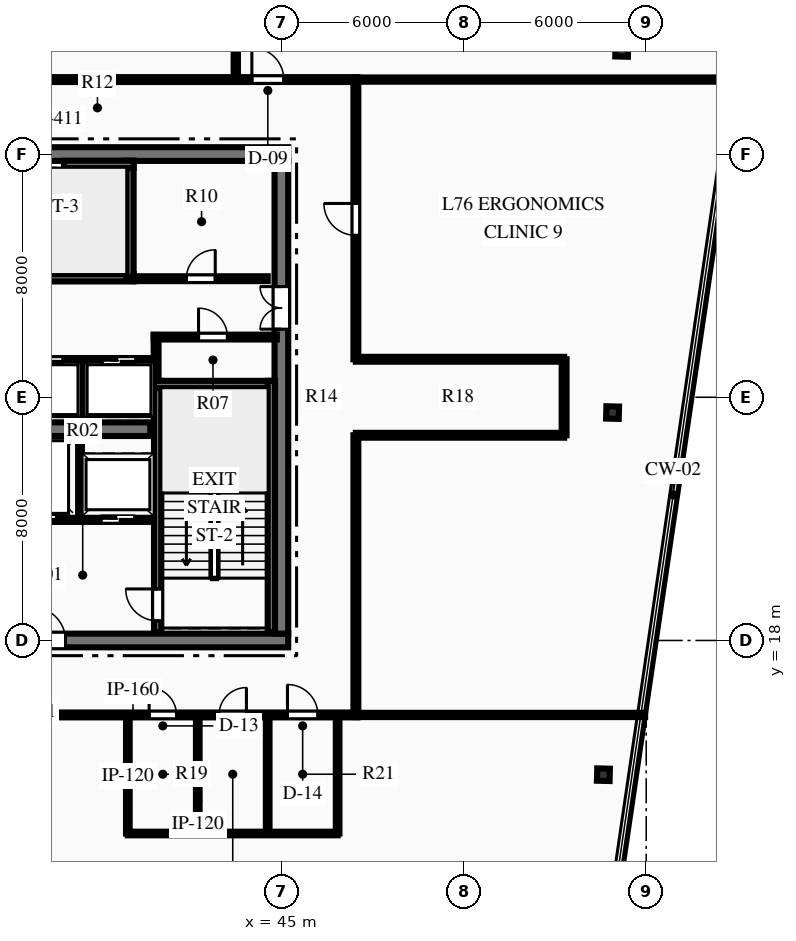
"""IFC4 building model, lengths in metres.
Left out: names, types, materials, properties, quantities, classifications, styles, units other than length and angle.
Written with IfcOpenShell. Run it as: python <this file> out.ifc"""

import sys

from ifc_helpers import new_model, si_unit, direction, frame, frame_2d, origin, origin_2d, place, context, subcontext, project, spatial, rectangle, i_section, extrude, element, fill, save


model = new_model("IFC4")
c1 = context("Model", 3, precision=1e-05, world=origin(), true_north=direction((0.0, 1.0)))
c2 = subcontext(c1, "Body", "Model", "MODEL_VIEW")
j1 = project(units=[si_unit("LENGTHUNIT", "METRE"), si_unit("PLANEANGLEUNIT", "RADIAN")], contexts=[c1])
p1 = place(None, origin())
s1 = spatial("IfcSite", under=j1, at=p1, CompositionType="ELEMENT")
p2 = place(p1, origin())
s2 = spatial("IfcBuilding", under=s1, at=p2, CompositionType="ELEMENT")
p3 = place(p2, frame((0.0, 0.0, 302.7)))
s3 = spatial("IfcBuildingStorey", under=s2, at=p3, CompositionType="ELEMENT", Elevation=302.7)
p4 = place(p3, frame((26.775, 18.0, 0.0), z_axis=(0.0, 0.0, 1.0), x_axis=(1.0, 0.0, 0.0)))
e1 = element("IfcWall", 1, at=p4, inside=s3, PredefinedType="SHEAR", context=c2, shape_type="SweptSolid", body=[
    extrude(rectangle(XDim=18.45, YDim=0.45, at=frame_2d((9.225, 0.0))), origin(), (0.0, 0.0, 1.0), 3.75),
])
p5 = place(p4, frame((7.325, 0.0, 0.0)))
e2 = element("IfcOpeningElement", 2, at=p5, cuts=e1, PredefinedType="OPENING", context=c2, shape_type="SweptSolid", body=[
    extrude(rectangle(XDim=1.1, YDim=2.15, at=frame_2d((0.55, 1.075))), frame((0.0, 0.235, 0.0), z_axis=(0.0, -1.0, 0.0), x_axis=(1.0, 0.0, 0.0)), (0.0, 0.0, 1.0), 0.47),
])
p6 = place(p4, frame((10.025, 0.0, 0.0)))
e3 = element("IfcOpeningElement", 3, at=p6, cuts=e1, PredefinedType="OPENING", context=c2, shape_type="SweptSolid", body=[
    extrude(rectangle(XDim=1.1, YDim=2.15, at=frame_2d((0.55, 1.075))), frame((0.0, 0.235, 0.0), z_axis=(0.0, -1.0, 0.0), x_axis=(1.0, 0.0, 0.0)), (0.0, 0.0, 1.0), 0.47),
])
p7 = place(p3, frame((26.775, 34.0, 0.0), z_axis=(0.0, 0.0, 1.0), x_axis=(1.0, 0.0, 0.0)))
e4 = element("IfcWall", 4, at=p7, inside=s3, PredefinedType="SHEAR", context=c2, shape_type="SweptSolid", body=[
    extrude(rectangle(XDim=18.45, YDim=0.45, at=frame_2d((9.225, 0.0))), origin(), (0.0, 0.0, 1.0), 3.75),
])
p8 = place(p3, frame((45.0, 18.225, 0.0), z_axis=(0.0, 0.0, 1.0), x_axis=(0.0, 1.0, 0.0)))
e5 = element("IfcWall", 5, at=p8, inside=s3, PredefinedType="SHEAR", context=c2, shape_type="SweptSolid", body=[
    extrude(rectangle(XDim=15.55, YDim=0.45, at=frame_2d((7.775, 0.0))), origin(), (0.0, 0.0, 1.0), 3.75),
])
p9 = place(p8, frame((10.015, 0.0, 0.0)))
e6 = element("IfcOpeningElement", 6, at=p9, cuts=e5, PredefinedType="OPENING", context=c2, shape_type="SweptSolid", body=[
    extrude(rectangle(XDim=1.4, YDim=2.2, at=frame_2d((0.7, 1.1))), frame((0.0, 0.235, 0.0), z_axis=(0.0, -1.0, 0.0), x_axis=(1.0, 0.0, 0.0)), (0.0, 0.0, 1.0), 0.47),
])
p10 = place(p3, frame((31.31, 24.95, 0.0), z_axis=(0.0, 0.0, 1.0), x_axis=(1.0, 0.0, 0.0)))
e7 = element("IfcWall", 7, at=p10, inside=s3, PredefinedType="SHEAR", context=c2, shape_type="SweptSolid", body=[
    extrude(rectangle(XDim=9.38, YDim=0.45, at=frame_2d((4.69, 0.0))), origin(), (0.0, 0.0, 1.0), 3.75),
])
p11 = place(p3, frame((40.93, 18.28, 0.0), z_axis=(0.0, 0.0, 1.0), x_axis=(0.0, 1.0, 0.0)))
e8 = element("IfcWall", 8, at=p11, inside=s3, PredefinedType="SHEAR", context=c2, shape_type="SweptSolid", body=[
    extrude(rectangle(XDim=8.26, YDim=0.24, at=frame_2d((4.13, 0.0))), origin(), (0.0, 0.0, 1.0), 3.75),
])
p12 = place(p11, frame((0.365, 0.0, 0.0)))
e9 = element("IfcOpeningElement", 9, at=p12, cuts=e8, PredefinedType="OPENING", context=c2, shape_type="SweptSolid", body=[
    extrude(rectangle(XDim=1.05, YDim=2.15, at=frame_2d((0.525, 1.075))), frame((0.0, 0.13, 0.0), z_axis=(0.0, -1.0, 0.0), x_axis=(1.0, 0.0, 0.0)), (0.0, 0.0, 1.0), 0.26),
])
p13 = place(p3, frame((40.81, 26.42, 0.0), z_axis=(0.0, 0.0, 1.0), x_axis=(1.0, 0.0, 0.0)))
e10 = element("IfcWall", 10, at=p13, inside=s3, PredefinedType="SHEAR", context=c2, shape_type="SweptSolid", body=[
    extrude(rectangle(XDim=3.98, YDim=0.24, at=frame_2d((1.99, 0.0))), origin(), (0.0, 0.0, 1.0), 3.75),
])
p14 = place(p3, frame((44.67, 18.28, 0.0), z_axis=(0.0, 0.0, 1.0), x_axis=(0.0, 1.0, 0.0)))
e11 = element("IfcWall", 11, at=p14, inside=s3, PredefinedType="SHEAR", context=c2, shape_type="SweptSolid", body=[
    extrude(rectangle(XDim=8.26, YDim=0.24, at=frame_2d((4.13, 0.0))), origin(), (0.0, 0.0, 1.0), 3.75),
])
p15 = place(p3, frame((31.76, 29.93, 0.0), z_axis=(0.0, 0.0, 1.0), x_axis=(1.0, 0.0, 0.0)))
e12 = element("IfcWall", 12, at=p15, inside=s3, PredefinedType="SHEAR", context=c2, shape_type="SweptSolid", body=[
    extrude(rectangle(XDim=8.38, YDim=0.24, at=frame_2d((4.19, 0.0))), origin(), (0.0, 0.0, 1.0), 3.75),
])
p16 = place(p15, frame((0.565, 0.0, 0.0)))
e13 = element("IfcOpeningElement", 13, at=p16, cuts=e12, PredefinedType="OPENING", context=c2, shape_type="SweptSolid", body=[
    extrude(rectangle(XDim=1.05, YDim=2.15, at=frame_2d((0.525, 1.075))), frame((0.0, 0.13, 0.0), z_axis=(0.0, -1.0, 0.0), x_axis=(1.0, 0.0, 0.0)), (0.0, 0.0, 1.0), 0.26),
])
p17 = place(p3, frame((40.02, 29.93, 0.0), z_axis=(0.0, 0.0, 1.0), x_axis=(0.0, 1.0, 0.0)))
e14 = element("IfcWall", 14, at=p17, inside=s3, PredefinedType="SHEAR", context=c2, shape_type="SweptSolid", body=[
    extrude(rectangle(XDim=3.85, YDim=0.24, at=frame_2d((1.925, 0.0))), origin(), (0.0, 0.0, 1.0), 3.75),
])
p18 = place(p3, frame((37.85, 33.66, 0.0), z_axis=(0.0, 0.0, 1.0), x_axis=(1.0, 0.0, 0.0)))
e15 = element("IfcWall", 15, at=p18, inside=s3, PredefinedType="SHEAR", context=c2, shape_type="SweptSolid", body=[
    extrude(rectangle(XDim=2.29, YDim=0.24, at=frame_2d((1.145, 0.0))), origin(), (0.0, 0.0, 1.0), 3.75),
])
for number, where, z_axis, x_axis in (
    (16, (55.592, 13.584, 0.0), (0.0, 0.0, 1.0), (0.025, 1.0, 0.0)),
    (17, (55.894, 25.496, 0.0), (0.0, 0.0, 1.0), (0.025, 1.0, 0.0)),
    (18, (56.195, 37.409, 0.0), (0.0, 0.0, 1.0), (0.025, 1.0, 0.0)),
):
    element("IfcColumn", number, at=place(p3, frame(where, z_axis=z_axis, x_axis=x_axis)), inside=s3, PredefinedType="COLUMN", context=c2, shape_type="SweptSolid", body=[
        extrude(i_section(OverallWidth=0.406, OverallDepth=0.416, WebThickness=0.03, FlangeThickness=0.048, at=origin_2d()), origin(), (0.0, 0.0, 1.0), 3.75),
    ])
p19 = place(p3, frame((36.12, 22.0, 0.0), z_axis=(0.0, 0.0, 1.0), x_axis=(1.0, 0.0, 0.0)))
e19 = element("IfcWall", 19, at=p19, inside=s3, PredefinedType="PARTITIONING", context=c2, shape_type="SweptSolid", body=[
    extrude(rectangle(XDim=4.69, YDim=0.2, at=frame_2d((2.345, 0.0))), origin(), (0.0, 0.0, 1.0), 3.49),
])
p20 = place(p19, frame((2.955, 0.0, 0.0)))
e20 = element("IfcOpeningElement", 20, at=p20, cuts=e19, PredefinedType="OPENING", context=c2, shape_type="SweptSolid", body=[
    extrude(rectangle(XDim=1.1, YDim=2.15, at=frame_2d((0.55, 1.075))), frame((0.0, 0.11, 0.0), z_axis=(0.0, -1.0, 0.0), x_axis=(1.0, 0.0, 0.0)), (0.0, 0.0, 1.0), 0.22),
])
p21 = place(p19, frame((0.08, 0.0, 0.0)))
e21 = element("IfcOpeningElement", 21, at=p21, cuts=e19, PredefinedType="OPENING", context=c2, shape_type="SweptSolid", body=[
    extrude(rectangle(XDim=1.4, YDim=2.2, at=frame_2d((0.7, 1.1))), frame((0.0, 0.11, 0.0), z_axis=(0.0, -1.0, 0.0), x_axis=(1.0, 0.0, 0.0)), (0.0, 0.0, 1.0), 0.22),
])
p22 = place(p3, frame((38.35, 22.05, 0.0), z_axis=(0.0, 0.0, 1.0), x_axis=(0.0, 1.0, 0.0)))
e22 = element("IfcWall", 22, at=p22, inside=s3, PredefinedType="PARTITIONING", context=c2, shape_type="SweptSolid", body=[
    extrude(rectangle(XDim=2.6, YDim=0.18, at=frame_2d((1.3, 0.0))), origin(), (0.0, 0.0, 1.0), 3.49),
])
p23 = place(p3, frame((40.8, 27.98, 0.0), z_axis=(0.0, 0.0, 1.0), x_axis=(1.0, 0.0, 0.0)))
e23 = element("IfcWall", 23, at=p23, inside=s3, PredefinedType="PARTITIONING", context=c2, shape_type="SweptSolid", body=[
    extrude(rectangle(XDim=4.05, YDim=0.16, at=frame_2d((2.025, 0.0))), origin(), (0.0, 0.0, 1.0), 3.49),
])
p24 = place(p23, frame((1.475, 0.0, 0.0)))
e24 = element("IfcOpeningElement", 24, at=p24, cuts=e23, PredefinedType="OPENING", context=c2, shape_type="SweptSolid", body=[
    extrude(rectangle(XDim=0.95, YDim=2.15, at=frame_2d((0.475, 1.075))), frame((0.0, 0.09, 0.0), z_axis=(0.0, -1.0, 0.0), x_axis=(1.0, 0.0, 0.0)), (0.0, 0.0, 1.0), 0.18),
])
p25 = place(p3, frame((40.88, 26.54, 0.0), z_axis=(0.0, 0.0, 1.0), x_axis=(0.0, 1.0, 0.0)))
e25 = element("IfcWall", 25, at=p25, inside=s3, PredefinedType="PARTITIONING", context=c2, shape_type="SweptSolid", body=[
    extrude(rectangle(XDim=1.51, YDim=0.16, at=frame_2d((0.755, 0.0))), origin(), (0.0, 0.0, 1.0), 3.49),
])
p26 = place(p3, frame((40.12, 29.9, 0.0), z_axis=(0.0, 0.0, 1.0), x_axis=(1.0, 0.0, 0.0)))
e26 = element("IfcWall", 26, at=p26, inside=s3, PredefinedType="PARTITIONING", context=c2, shape_type="SweptSolid", body=[
    extrude(rectangle(XDim=4.43, YDim=0.16, at=frame_2d((2.215, 0.0))), origin(), (0.0, 0.0, 1.0), 3.49),
])
p27 = place(p26, frame((1.755, 0.0, 0.0)))
e27 = element("IfcOpeningElement", 27, at=p27, cuts=e26, PredefinedType="OPENING", context=c2, shape_type="SweptSolid", body=[
    extrude(rectangle(XDim=0.95, YDim=2.15, at=frame_2d((0.475, 1.075))), frame((0.0, 0.09, 0.0), z_axis=(0.0, -1.0, 0.0), x_axis=(1.0, 0.0, 0.0)), (0.0, 0.0, 1.0), 0.18),
])
p28 = place(p3, frame((31.2, 27.2, 0.0), z_axis=(0.0, 0.0, 1.0), x_axis=(1.0, 0.0, 0.0)))
e28 = element("IfcWall", 28, at=p28, inside=s3, PredefinedType="PARTITIONING", context=c2, shape_type="SweptSolid", body=[
    extrude(rectangle(XDim=9.6, YDim=0.18, at=frame_2d((4.8, 0.0))), origin(), (0.0, 0.0, 1.0), 3.49),
])
p29 = place(p28, frame((0.59, 0.0, 0.0)))
e29 = element("IfcOpeningElement", 29, at=p29, cuts=e28, PredefinedType="OPENING", context=c2, shape_type="SweptSolid", body=[
    extrude(rectangle(XDim=1.1, YDim=2.15, at=frame_2d((0.55, 1.075))), frame((0.0, 0.1, 0.0), z_axis=(0.0, -1.0, 0.0), x_axis=(1.0, 0.0, 0.0)), (0.0, 0.0, 1.0), 0.2),
])
p30 = place(p28, frame((2.99, 0.0, 0.0)))
e30 = element("IfcOpeningElement", 30, at=p30, cuts=e28, PredefinedType="OPENING", context=c2, shape_type="SweptSolid", body=[
    extrude(rectangle(XDim=1.1, YDim=2.15, at=frame_2d((0.55, 1.075))), frame((0.0, 0.1, 0.0), z_axis=(0.0, -1.0, 0.0), x_axis=(1.0, 0.0, 0.0)), (0.0, 0.0, 1.0), 0.2),
])
p31 = place(p28, frame((5.51, 0.0, 0.0)))
e31 = element("IfcOpeningElement", 31, at=p31, cuts=e28, PredefinedType="OPENING", context=c2, shape_type="SweptSolid", body=[
    extrude(rectangle(XDim=1.1, YDim=2.15, at=frame_2d((0.55, 1.075))), frame((0.0, 0.1, 0.0), z_axis=(0.0, -1.0, 0.0), x_axis=(1.0, 0.0, 0.0)), (0.0, 0.0, 1.0), 0.2),
])
p32 = place(p28, frame((7.91, 0.0, 0.0)))
e32 = element("IfcOpeningElement", 32, at=p32, cuts=e28, PredefinedType="OPENING", context=c2, shape_type="SweptSolid", body=[
    extrude(rectangle(XDim=1.1, YDim=2.15, at=frame_2d((0.55, 1.075))), frame((0.0, 0.1, 0.0), z_axis=(0.0, -1.0, 0.0), x_axis=(1.0, 0.0, 0.0)), (0.0, 0.0, 1.0), 0.2),
])
p33 = place(p3, frame((38.46, 25.3, 0.0), z_axis=(0.0, 0.0, 1.0), x_axis=(0.0, 1.0, 0.0)))
e33 = element("IfcWall", 33, at=p33, inside=s3, PredefinedType="PARTITIONING", context=c2, shape_type="SweptSolid", body=[
    extrude(rectangle(XDim=1.9, YDim=0.18, at=frame_2d((0.95, 0.0))), origin(), (0.0, 0.0, 1.0), 3.49),
])
p34 = place(p3, frame((37.25, 15.55, 0.0), z_axis=(0.0, 0.0, 1.0), x_axis=(1.0, 0.0, 0.0)))
e34 = element("IfcWall", 34, at=p34, inside=s3, PredefinedType="PARTITIONING", context=c2, shape_type="SweptSolid", body=[
    extrude(rectangle(XDim=10.25, YDim=0.16, at=frame_2d((5.125, 0.0))), origin(), (0.0, 0.0, 1.0), 3.49),
])
p35 = place(p34, frame((3.4, 0.0, 0.0)))
e35 = element("IfcOpeningElement", 35, at=p35, cuts=e34, PredefinedType="OPENING", context=c2, shape_type="SweptSolid", body=[
    extrude(rectangle(XDim=0.9, YDim=2.15, at=frame_2d((0.45, 1.075))), frame((0.0, 0.09, 0.0), z_axis=(0.0, -1.0, 0.0), x_axis=(1.0, 0.0, 0.0)), (0.0, 0.0, 1.0), 0.18),
])
p36 = place(p34, frame((5.7, 0.0, 0.0)))
e36 = element("IfcOpeningElement", 36, at=p36, cuts=e34, PredefinedType="OPENING", context=c2, shape_type="SweptSolid", body=[
    extrude(rectangle(XDim=0.9, YDim=2.15, at=frame_2d((0.45, 1.075))), frame((0.0, 0.09, 0.0), z_axis=(0.0, -1.0, 0.0), x_axis=(1.0, 0.0, 0.0)), (0.0, 0.0, 1.0), 0.18),
])
p37 = place(p34, frame((7.95, 0.0, 0.0)))
e37 = element("IfcOpeningElement", 37, at=p37, cuts=e34, PredefinedType="OPENING", context=c2, shape_type="SweptSolid", body=[
    extrude(rectangle(XDim=1.0, YDim=2.15, at=frame_2d((0.5, 1.075))), frame((0.0, 0.09, 0.0), z_axis=(0.0, -1.0, 0.0), x_axis=(1.0, 0.0, 0.0)), (0.0, 0.0, 1.0), 0.18),
])
p38 = place(p3, frame((37.25, 36.45, 0.0), z_axis=(0.0, 0.0, 1.0), x_axis=(1.0, 0.0, 0.0)))
e38 = element("IfcWall", 38, at=p38, inside=s3, PredefinedType="PARTITIONING", context=c2, shape_type="SweptSolid", body=[
    extrude(rectangle(XDim=10.25, YDim=0.16, at=frame_2d((5.125, 0.0))), origin(), (0.0, 0.0, 1.0), 3.49),
])
p39 = place(p38, frame((6.779, 0.0, 0.0)))
e39 = element("IfcOpeningElement", 39, at=p39, cuts=e38, PredefinedType="OPENING", context=c2, shape_type="SweptSolid", body=[
    extrude(rectangle(XDim=1.05, YDim=2.15, at=frame_2d((0.525, 1.075))), frame((0.0, 0.09, 0.0), z_axis=(0.0, -1.0, 0.0), x_axis=(1.0, 0.0, 0.0)), (0.0, 0.0, 1.0), 0.18),
])
p40 = place(p3, frame((47.45, 15.55, 0.0), z_axis=(0.0, 0.0, 1.0), x_axis=(0.0, 1.0, 0.0)))
e40 = element("IfcWall", 40, at=p40, inside=s3, PredefinedType="PARTITIONING", context=c2, shape_type="SweptSolid", body=[
    extrude(rectangle(XDim=9.2, YDim=0.16, at=frame_2d((4.6, 0.0))), origin(), (0.0, 0.0, 1.0), 3.49),
])
p41 = place(p3, frame((47.45, 27.25, 0.0), z_axis=(0.0, 0.0, 1.0), x_axis=(0.0, 1.0, 0.0)))
e41 = element("IfcWall", 41, at=p41, inside=s3, PredefinedType="PARTITIONING", context=c2, shape_type="SweptSolid", body=[
    extrude(rectangle(XDim=9.2, YDim=0.16, at=frame_2d((4.6, 0.0))), origin(), (0.0, 0.0, 1.0), 3.49),
])
p42 = place(p41, frame((4.075, 0.0, 0.0)))
e42 = element("IfcOpeningElement", 42, at=p42, cuts=e41, PredefinedType="OPENING", context=c2, shape_type="SweptSolid", body=[
    extrude(rectangle(XDim=1.05, YDim=2.15, at=frame_2d((0.525, 1.075))), frame((0.0, 0.09, 0.0), z_axis=(0.0, -1.0, 0.0), x_axis=(1.0, 0.0, 0.0)), (0.0, 0.0, 1.0), 0.18),
])
for number, where, z_axis, x_axis in (
    (43, (47.45, 24.75, 0.0), (0.0, 0.0, 1.0), (1.0, 0.0, 0.0)),
    (44, (47.45, 27.25, 0.0), (0.0, 0.0, 1.0), (1.0, 0.0, 0.0)),
):
    element("IfcWall", number, at=place(p3, frame(where, z_axis=z_axis, x_axis=x_axis)), inside=s3, PredefinedType="PARTITIONING", context=c2, shape_type="SweptSolid", body=[
        extrude(rectangle(XDim=6.85, YDim=0.16, at=frame_2d((3.425, 0.0))), origin(), (0.0, 0.0, 1.0), 3.49),
    ])
p43 = place(p3, frame((54.3, 24.75, 0.0), z_axis=(0.0, 0.0, 1.0), x_axis=(0.0, 1.0, 0.0)))
e45 = element("IfcWall", 45, at=p43, inside=s3, PredefinedType="PARTITIONING", context=c2, shape_type="SweptSolid", body=[
    extrude(rectangle(XDim=2.5, YDim=0.16, at=frame_2d((1.25, 0.0))), origin(), (0.0, 0.0, 1.0), 3.49),
])
for number, where, z_axis, x_axis in (
    (46, (39.95, 11.65, 0.0), (0.0, 0.0, 1.0), (0.0, 1.0, 0.0)),
    (47, (42.25, 11.65, 0.0), (0.0, 0.0, 1.0), (0.0, 1.0, 0.0)),
    (48, (44.55, 11.65, 0.0), (0.0, 0.0, 1.0), (0.0, 1.0, 0.0)),
    (49, (46.85, 11.65, 0.0), (0.0, 0.0, 1.0), (0.0, 1.0, 0.0)),
):
    element("IfcWall", number, at=place(p3, frame(where, z_axis=z_axis, x_axis=x_axis)), inside=s3, PredefinedType="PARTITIONING", context=c2, shape_type="SweptSolid", body=[
        extrude(rectangle(XDim=3.9, YDim=0.12, at=frame_2d((1.95, 0.0))), origin(), (0.0, 0.0, 1.0), 3.49),
    ])
p44 = place(p3, frame((39.95, 11.65, 0.0), z_axis=(0.0, 0.0, 1.0), x_axis=(1.0, 0.0, 0.0)))
e50 = element("IfcWall", 50, at=p44, inside=s3, PredefinedType="PARTITIONING", context=c2, shape_type="SweptSolid", body=[
    extrude(rectangle(XDim=6.9, YDim=0.12, at=frame_2d((3.45, 0.0))), origin(), (0.0, 0.0, 1.0), 3.49),
])
p45 = place(p3, frame((47.45, 15.55, 0.0), z_axis=(0.0, 0.0, 1.0), x_axis=(1.0, 0.0, 0.0)))
e51 = element("IfcWall", 51, at=p45, inside=s3, PredefinedType="PARTITIONING", context=c2, shape_type="SweptSolid", body=[
    extrude(rectangle(XDim=9.515, YDim=0.14, at=frame_2d((4.757, 0.0))), origin(), (0.0, 0.0, 1.0), 2.868),
])
p46 = place(p3, frame((47.45, 36.45, 0.0), z_axis=(0.0, 0.0, 1.0), x_axis=(1.0, 0.0, 0.0)))
e52 = element("IfcWall", 52, at=p46, inside=s3, PredefinedType="PARTITIONING", context=c2, shape_type="SweptSolid", body=[
    extrude(rectangle(XDim=12.582, YDim=0.14, at=frame_2d((6.291, 0.0))), origin(), (0.0, 0.0, 1.0), 3.079),
])
p47 = place(p3, frame((43.5, 36.45, 0.0), z_axis=(0.0, 0.0, 1.0), x_axis=(0.0, 1.0, 0.0)))
e53 = element("IfcWall", 53, at=p47, inside=s3, PredefinedType="PARTITIONING", context=c2, shape_type="SweptSolid", body=[
    extrude(rectangle(XDim=11.251, YDim=0.14, at=frame_2d((5.625, 0.0))), origin(), (0.0, 0.0, 1.0), 3.49),
])
p48 = place(p24, origin())
e54 = element("IfcDoor", 54, at=p48, inside=s3, OperationType="SINGLE_SWING_LEFT", PredefinedType="DOOR", context=c2, shape_type="SweptSolid", body=[
    extrude(rectangle(XDim=0.95, YDim=2.15, at=frame_2d((0.475, 1.075))), frame((0.0, 0.025, 0.0), z_axis=(0.0, -1.0, 0.0), x_axis=(1.0, 0.0, 0.0)), (0.0, 0.0, 1.0), 0.05),
])
fill(e24, e54)
p49 = place(p27, origin())
e55 = element("IfcDoor", 55, at=p49, inside=s3, OperationType="SINGLE_SWING_RIGHT", PredefinedType="DOOR", context=c2, shape_type="SweptSolid", body=[
    extrude(rectangle(XDim=0.95, YDim=2.15, at=frame_2d((0.475, 1.075))), frame((0.0, 0.025, 0.0), z_axis=(0.0, -1.0, 0.0), x_axis=(1.0, 0.0, 0.0)), (0.0, 0.0, 1.0), 0.05),
])
fill(e27, e55)
p50 = place(p12, origin())
e56 = element("IfcDoor", 56, at=p50, inside=s3, OperationType="SINGLE_SWING_RIGHT", PredefinedType="DOOR", context=c2, shape_type="SweptSolid", body=[
    extrude(rectangle(XDim=1.05, YDim=2.15, at=frame_2d((0.525, 1.075))), frame((0.0, 0.025, 0.0), z_axis=(0.0, -1.0, 0.0), x_axis=(1.0, 0.0, 0.0)), (0.0, 0.0, 1.0), 0.05),
])
fill(e9, e56)
p51 = place(p6, origin())
e57 = element("IfcDoor", 57, at=p51, inside=s3, OperationType="SINGLE_SWING_LEFT", PredefinedType="DOOR", context=c2, shape_type="SweptSolid", body=[
    extrude(rectangle(XDim=1.1, YDim=2.15, at=frame_2d((0.55, 1.075))), frame((0.0, 0.025, 0.0), z_axis=(0.0, -1.0, 0.0), x_axis=(1.0, 0.0, 0.0)), (0.0, 0.0, 1.0), 0.05),
])
fill(e3, e57)
p52 = place(p9, origin())
e58 = element("IfcDoor", 58, at=p52, inside=s3, OperationType="DOUBLE_DOOR_SINGLE_SWING", PredefinedType="DOOR", context=c2, shape_type="SweptSolid", body=[
    extrude(rectangle(XDim=1.4, YDim=2.2, at=frame_2d((0.7, 1.1))), frame((0.0, 0.025, 0.0), z_axis=(0.0, -1.0, 0.0), x_axis=(1.0, 0.0, 0.0)), (0.0, 0.0, 1.0), 0.05),
])
fill(e6, e58)
p53 = place(p35, origin())
e59 = element("IfcDoor", 59, at=p53, inside=s3, OperationType="SINGLE_SWING_LEFT", PredefinedType="DOOR", context=c2, shape_type="SweptSolid", body=[
    extrude(rectangle(XDim=0.9, YDim=2.15, at=frame_2d((0.45, 1.075))), frame((0.0, 0.025, 0.0), z_axis=(0.0, -1.0, 0.0), x_axis=(1.0, 0.0, 0.0)), (0.0, 0.0, 1.0), 0.05),
])
fill(e35, e59)
p54 = place(p36, origin())
e60 = element("IfcDoor", 60, at=p54, inside=s3, OperationType="SINGLE_SWING_RIGHT", PredefinedType="DOOR", context=c2, shape_type="SweptSolid", body=[
    extrude(rectangle(XDim=0.9, YDim=2.15, at=frame_2d((0.45, 1.075))), frame((0.0, 0.025, 0.0), z_axis=(0.0, -1.0, 0.0), x_axis=(1.0, 0.0, 0.0)), (0.0, 0.0, 1.0), 0.05),
])
fill(e36, e60)
p55 = place(p37, origin())
e61 = element("IfcDoor", 61, at=p55, inside=s3, OperationType="SINGLE_SWING_LEFT", PredefinedType="DOOR", context=c2, shape_type="SweptSolid", body=[
    extrude(rectangle(XDim=1.0, YDim=2.15, at=frame_2d((0.5, 1.075))), frame((0.0, 0.025, 0.0), z_axis=(0.0, -1.0, 0.0), x_axis=(1.0, 0.0, 0.0)), (0.0, 0.0, 1.0), 0.05),
])
fill(e37, e61)
p56 = place(p39, origin())
e62 = element("IfcDoor", 62, at=p56, inside=s3, OperationType="SINGLE_SWING_LEFT", PredefinedType="DOOR", context=c2, shape_type="SweptSolid", body=[
    extrude(rectangle(XDim=1.05, YDim=2.15, at=frame_2d((0.525, 1.075))), frame((0.0, 0.025, 0.0), z_axis=(0.0, -1.0, 0.0), x_axis=(1.0, 0.0, 0.0)), (0.0, 0.0, 1.0), 0.05),
])
fill(e39, e62)
p57 = place(p42, origin())
e63 = element("IfcDoor", 63, at=p57, inside=s3, OperationType="SINGLE_SWING_RIGHT", PredefinedType="DOOR", context=c2, shape_type="SweptSolid", body=[
    extrude(rectangle(XDim=1.05, YDim=2.15, at=frame_2d((0.525, 1.075))), frame((0.0, 0.025, 0.0), z_axis=(0.0, -1.0, 0.0), x_axis=(1.0, 0.0, 0.0)), (0.0, 0.0, 1.0), 0.05),
])
fill(e42, e63)
p58 = place(p31, origin())
e64 = element("IfcDoor", 64, at=p58, inside=s3, OperationType="SLIDING_TO_LEFT", PredefinedType="DOOR", context=c2, shape_type="SweptSolid", body=[
    extrude(rectangle(XDim=1.1, YDim=2.15, at=frame_2d((0.55, 1.075))), frame((0.0, 0.025, 0.0), z_axis=(0.0, -1.0, 0.0), x_axis=(1.0, 0.0, 0.0)), (0.0, 0.0, 1.0), 0.05),
])
fill(e31, e64)
p59 = place(p32, origin())
e65 = element("IfcDoor", 65, at=p59, inside=s3, OperationType="SLIDING_TO_LEFT", PredefinedType="DOOR", context=c2, shape_type="SweptSolid", body=[
    extrude(rectangle(XDim=1.1, YDim=2.15, at=frame_2d((0.55, 1.075))), frame((0.0, 0.025, 0.0), z_axis=(0.0, -1.0, 0.0), x_axis=(1.0, 0.0, 0.0)), (0.0, 0.0, 1.0), 0.05),
])
fill(e32, e65)
p60 = place(p20, origin())
e66 = element("IfcDoor", 66, at=p60, inside=s3, OperationType="SLIDING_TO_LEFT", PredefinedType="DOOR", context=c2, shape_type="SweptSolid", body=[
    extrude(rectangle(XDim=1.1, YDim=2.15, at=frame_2d((0.55, 1.075))), frame((0.0, 0.025, 0.0), z_axis=(0.0, -1.0, 0.0), x_axis=(1.0, 0.0, 0.0)), (0.0, 0.0, 1.0), 0.05),
])
fill(e20, e66)
p61 = place(p21, origin())
e67 = element("IfcDoor", 67, at=p61, inside=s3, OperationType="SLIDING_TO_LEFT", PredefinedType="DOOR", context=c2, shape_type="SweptSolid", body=[
    extrude(rectangle(XDim=1.4, YDim=2.2, at=frame_2d((0.7, 1.1))), frame((0.0, 0.025, 0.0), z_axis=(0.0, -1.0, 0.0), x_axis=(1.0, 0.0, 0.0)), (0.0, 0.0, 1.0), 0.05),
])
fill(e21, e67)
save(model, sys.argv[1])
